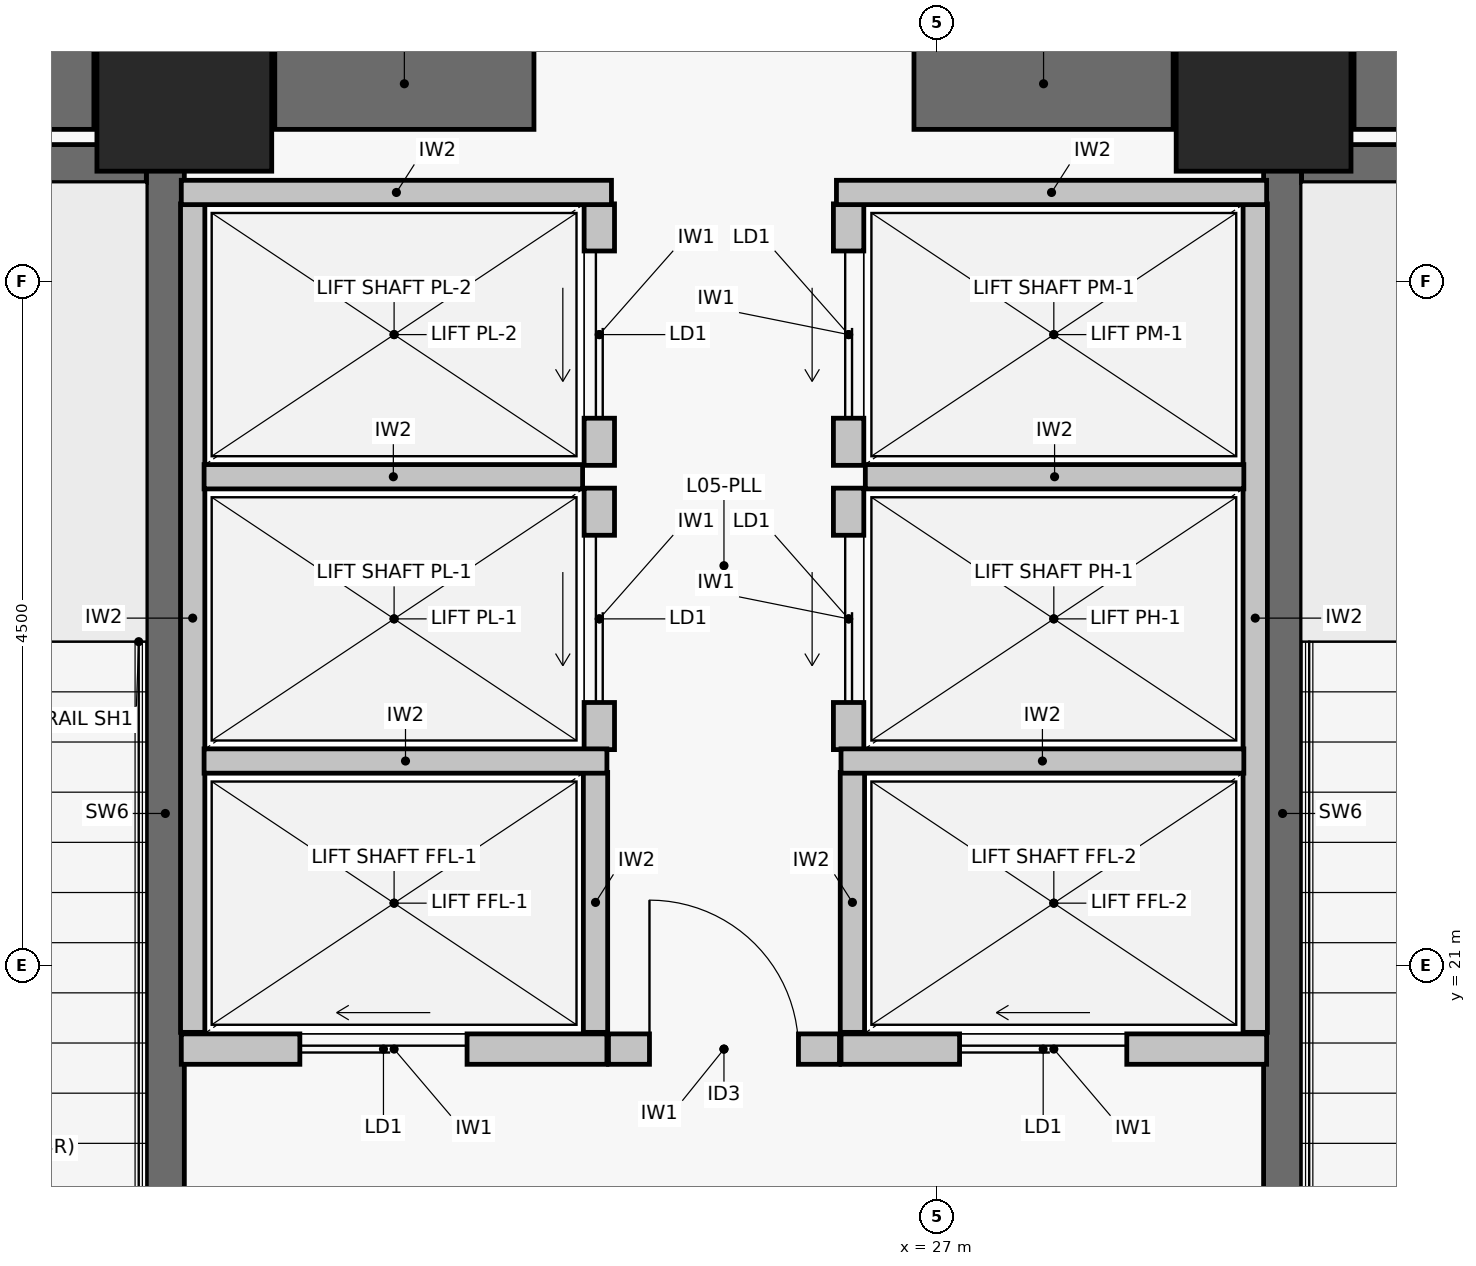
"""IFC4 building model, lengths in metres.
Left out: names, types, materials, properties, quantities, classifications, styles, units other than length and angle.
Written with IfcOpenShell. Run it as: python <this file> out.ifc"""

import sys

from ifc_helpers import new_model, si_unit, direction, frame, frame_2d, origin, origin_2d, place, context, subcontext, project, spatial, rectangle, extrude, element, fill, save


model = new_model("IFC4")
c1 = context("Model", 3, precision=1e-05, world=origin(), true_north=direction((0.0, 1.0)))
c2 = subcontext(c1, "Body", "Model", "MODEL_VIEW")
j1 = project(units=[si_unit("LENGTHUNIT", "METRE"), si_unit("PLANEANGLEUNIT", "RADIAN")], contexts=[c1])
p1 = place(None, origin())
s1 = spatial("IfcSite", under=j1, at=p1, CompositionType="ELEMENT")
p2 = place(p1, origin())
s2 = spatial("IfcBuilding", under=s1, at=p2, CompositionType="ELEMENT")
p3 = place(p2, frame((0.0, 0.0, 27.6)))
s3 = spatial("IfcBuildingStorey", under=s2, at=p3, CompositionType="ELEMENT", Elevation=27.6)
for number, where, z_axis, x_axis in (
    (1, (22.05, 26.8, 0.0), (0.0, 0.0, 1.0), (1.0, 0.0, 0.0)),
    (2, (29.15, 26.8, 0.0), (0.0, 0.0, 1.0), (1.0, 0.0, 0.0)),
):
    element("IfcColumn", number, at=place(p3, frame(where, z_axis=z_axis, x_axis=x_axis)), inside=s3, PredefinedType="COLUMN", context=c2, shape_type="SweptSolid", body=[
        extrude(rectangle(XDim=1.15, YDim=1.15, at=origin_2d()), origin(), (0.0, 0.0, 1.0), 3.72),
    ])
p4 = place(p3, frame((18.395, 26.8, 0.0), z_axis=(0.0, 0.0, 1.0), x_axis=(1.0, 0.0, 0.0)))
e3 = element("IfcWall", 3, at=p4, inside=s3, PredefinedType="SHEAR", context=c2, shape_type="SweptSolid", body=[
    extrude(rectangle(XDim=3.06, YDim=0.6, at=frame_2d((1.53, 0.0))), origin(), (0.0, 0.0, 1.0), 3.47),
])
p5 = place(p3, frame((22.645, 26.8, 0.0), z_axis=(0.0, 0.0, 1.0), x_axis=(1.0, 0.0, 0.0)))
e4 = element("IfcWall", 4, at=p5, inside=s3, PredefinedType="SHEAR", context=c2, shape_type="SweptSolid", body=[
    extrude(rectangle(XDim=1.705, YDim=0.6, at=frame_2d((0.853, 0.0))), origin(), (0.0, 0.0, 1.0), 3.47),
])
p6 = place(p3, frame((26.85, 26.8, 0.0), z_axis=(0.0, 0.0, 1.0), x_axis=(1.0, 0.0, 0.0)))
e5 = element("IfcWall", 5, at=p6, inside=s3, PredefinedType="SHEAR", context=c2, shape_type="SweptSolid", body=[
    extrude(rectangle(XDim=1.705, YDim=0.6, at=frame_2d((0.853, 0.0))), origin(), (0.0, 0.0, 1.0), 3.47),
])
p7 = place(p3, frame((29.745, 26.8, 0.0), z_axis=(0.0, 0.0, 1.0), x_axis=(1.0, 0.0, 0.0)))
e6 = element("IfcWall", 6, at=p7, inside=s3, PredefinedType="SHEAR", context=c2, shape_type="SweptSolid", body=[
    extrude(rectangle(XDim=3.06, YDim=0.6, at=frame_2d((1.53, 0.0))), origin(), (0.0, 0.0, 1.0), 3.47),
])
p8 = place(p3, frame((21.925, 17.6, 0.0), z_axis=(0.0, 0.0, 1.0), x_axis=(0.0, 1.0, 0.0)))
e7 = element("IfcWall", 7, at=p8, inside=s3, PredefinedType="SHEAR", context=c2, shape_type="SweptSolid", body=[
    extrude(rectangle(XDim=8.8, YDim=0.25, at=frame_2d((4.4, 0.0))), origin(), (0.0, 0.0, 1.0), 3.47),
])
p9 = place(p8, frame((0.35, 0.0, 0.0)))
e8 = element("IfcOpeningElement", 8, at=p9, cuts=e7, PredefinedType="OPENING", context=c2, shape_type="SweptSolid", body=[
    extrude(rectangle(XDim=1.05, YDim=2.08, at=frame_2d((0.525, 1.04))), frame((0.0, 0.135, 0.0), z_axis=(0.0, -1.0, 0.0), x_axis=(1.0, 0.0, 0.0)), (0.0, 0.0, 1.0), 0.27),
])
p10 = place(p3, frame((18.354, 26.275, 0.0), z_axis=(0.0, 0.0, 1.0), x_axis=(1.0, 0.0, 0.0)))
e9 = element("IfcWall", 9, at=p10, inside=s3, PredefinedType="SHEAR", context=c2, shape_type="SweptSolid", body=[
    extrude(rectangle(XDim=3.446, YDim=0.25, at=frame_2d((1.723, 0.0))), origin(), (0.0, 0.0, 1.0), 3.47),
])
p11 = place(p3, frame((29.275, 17.6, 0.0), z_axis=(0.0, 0.0, 1.0), x_axis=(0.0, 1.0, 0.0)))
e10 = element("IfcWall", 10, at=p11, inside=s3, PredefinedType="SHEAR", context=c2, shape_type="SweptSolid", body=[
    extrude(rectangle(XDim=8.8, YDim=0.25, at=frame_2d((4.4, 0.0))), origin(), (0.0, 0.0, 1.0), 3.47),
])
p12 = place(p11, frame((0.35, 0.0, 0.0)))
e11 = element("IfcOpeningElement", 11, at=p12, cuts=e10, PredefinedType="OPENING", context=c2, shape_type="SweptSolid", body=[
    extrude(rectangle(XDim=1.05, YDim=2.08, at=frame_2d((0.525, 1.04))), frame((0.0, 0.135, 0.0), z_axis=(0.0, -1.0, 0.0), x_axis=(1.0, 0.0, 0.0)), (0.0, 0.0, 1.0), 0.27),
])
p13 = place(p3, frame((29.4, 26.275, 0.0), z_axis=(0.0, 0.0, 1.0), x_axis=(1.0, 0.0, 0.0)))
e12 = element("IfcWall", 12, at=p13, inside=s3, PredefinedType="SHEAR", context=c2, shape_type="SweptSolid", body=[
    extrude(rectangle(XDim=3.446, YDim=0.25, at=frame_2d((1.723, 0.0))), origin(), (0.0, 0.0, 1.0), 3.47),
])
p14 = place(p3, frame((24.84, 20.45, 0.0), z_axis=(0.0, 0.0, 1.0), x_axis=(1.0, 0.0, 0.0)))
e13 = element("IfcWall", 13, at=p14, inside=s3, PredefinedType="PARTITIONING", context=c2, shape_type="SweptSolid", body=[
    extrude(rectangle(XDim=1.52, YDim=0.2, at=frame_2d((0.76, 0.0))), origin(), (0.0, 0.0, 1.0), 3.47),
])
p15 = place(p14, frame((0.27, 0.0, 0.0)))
e14 = element("IfcOpeningElement", 14, at=p15, cuts=e13, PredefinedType="OPENING", context=c2, shape_type="SweptSolid", body=[
    extrude(rectangle(XDim=0.98, YDim=2.06, at=frame_2d((0.49, 1.03))), frame((0.0, 0.11, 0.0), z_axis=(0.0, -1.0, 0.0), x_axis=(1.0, 0.0, 0.0)), (0.0, 0.0, 1.0), 0.22),
])
p16 = place(p3, frame((22.03, 20.45, 0.0), z_axis=(0.0, 0.0, 1.0), x_axis=(1.0, 0.0, 0.0)))
e15 = element("IfcWall", 15, at=p16, inside=s3, PredefinedType="PARTITIONING", context=c2, shape_type="SweptSolid", body=[
    extrude(rectangle(XDim=2.8, YDim=0.2, at=frame_2d((1.4, 0.0))), origin(), (0.0, 0.0, 1.0), 3.47),
])
p17 = place(p16, frame((0.78, 0.0, 0.0)))
e16 = element("IfcOpeningElement", 16, at=p17, cuts=e15, PredefinedType="OPENING", context=c2, shape_type="SweptSolid", body=[
    extrude(rectangle(XDim=1.1, YDim=2.08, at=frame_2d((0.55, 1.04))), frame((0.0, 0.11, 0.0), z_axis=(0.0, -1.0, 0.0), x_axis=(1.0, 0.0, 0.0)), (0.0, 0.0, 1.0), 0.22),
])
p18 = place(p3, frame((26.37, 20.45, 0.0), z_axis=(0.0, 0.0, 1.0), x_axis=(1.0, 0.0, 0.0)))
e17 = element("IfcWall", 17, at=p18, inside=s3, PredefinedType="PARTITIONING", context=c2, shape_type="SweptSolid", body=[
    extrude(rectangle(XDim=2.8, YDim=0.2, at=frame_2d((1.4, 0.0))), origin(), (0.0, 0.0, 1.0), 3.47),
])
p19 = place(p18, frame((0.78, 0.0, 0.0)))
e18 = element("IfcOpeningElement", 18, at=p19, cuts=e17, PredefinedType="OPENING", context=c2, shape_type="SweptSolid", body=[
    extrude(rectangle(XDim=1.1, YDim=2.08, at=frame_2d((0.55, 1.04))), frame((0.0, 0.11, 0.0), z_axis=(0.0, -1.0, 0.0), x_axis=(1.0, 0.0, 0.0)), (0.0, 0.0, 1.0), 0.22),
])
p20 = place(p3, frame((24.78, 22.42, 0.0), z_axis=(0.0, 0.0, 1.0), x_axis=(0.0, 1.0, 0.0)))
e19 = element("IfcWall", 19, at=p20, inside=s3, PredefinedType="PARTITIONING", context=c2, shape_type="SweptSolid", body=[
    extrude(rectangle(XDim=1.72, YDim=0.2, at=frame_2d((0.86, 0.0))), origin(), (0.0, 0.0, 1.0), 3.47),
])
p21 = place(p20, frame((0.31, 0.0, 0.0)))
e20 = element("IfcOpeningElement", 20, at=p21, cuts=e19, PredefinedType="OPENING", context=c2, shape_type="SweptSolid", body=[
    extrude(rectangle(XDim=1.1, YDim=2.08, at=frame_2d((0.55, 1.04))), frame((0.0, 0.11, 0.0), z_axis=(0.0, -1.0, 0.0), x_axis=(1.0, 0.0, 0.0)), (0.0, 0.0, 1.0), 0.22),
])
p22 = place(p3, frame((24.78, 24.29, 0.0), z_axis=(0.0, 0.0, 1.0), x_axis=(0.0, 1.0, 0.0)))
e21 = element("IfcWall", 21, at=p22, inside=s3, PredefinedType="PARTITIONING", context=c2, shape_type="SweptSolid", body=[
    extrude(rectangle(XDim=1.72, YDim=0.2, at=frame_2d((0.86, 0.0))), origin(), (0.0, 0.0, 1.0), 3.47),
])
p23 = place(p22, frame((0.31, 0.0, 0.0)))
e22 = element("IfcOpeningElement", 22, at=p23, cuts=e21, PredefinedType="OPENING", context=c2, shape_type="SweptSolid", body=[
    extrude(rectangle(XDim=1.1, YDim=2.08, at=frame_2d((0.55, 1.04))), frame((0.0, 0.11, 0.0), z_axis=(0.0, -1.0, 0.0), x_axis=(1.0, 0.0, 0.0)), (0.0, 0.0, 1.0), 0.22),
])
p24 = place(p3, frame((26.42, 22.42, 0.0), z_axis=(0.0, 0.0, 1.0), x_axis=(0.0, 1.0, 0.0)))
e23 = element("IfcWall", 23, at=p24, inside=s3, PredefinedType="PARTITIONING", context=c2, shape_type="SweptSolid", body=[
    extrude(rectangle(XDim=1.72, YDim=0.2, at=frame_2d((0.86, 0.0))), origin(), (0.0, 0.0, 1.0), 3.47),
])
p25 = place(p24, frame((0.31, 0.0, 0.0)))
e24 = element("IfcOpeningElement", 24, at=p25, cuts=e23, PredefinedType="OPENING", context=c2, shape_type="SweptSolid", body=[
    extrude(rectangle(XDim=1.1, YDim=2.08, at=frame_2d((0.55, 1.04))), frame((0.0, 0.11, 0.0), z_axis=(0.0, -1.0, 0.0), x_axis=(1.0, 0.0, 0.0)), (0.0, 0.0, 1.0), 0.22),
])
p26 = place(p3, frame((26.42, 24.29, 0.0), z_axis=(0.0, 0.0, 1.0), x_axis=(0.0, 1.0, 0.0)))
e25 = element("IfcWall", 25, at=p26, inside=s3, PredefinedType="PARTITIONING", context=c2, shape_type="SweptSolid", body=[
    extrude(rectangle(XDim=1.72, YDim=0.2, at=frame_2d((0.86, 0.0))), origin(), (0.0, 0.0, 1.0), 3.47),
])
p27 = place(p26, frame((0.31, 0.0, 0.0)))
e26 = element("IfcOpeningElement", 26, at=p27, cuts=e25, PredefinedType="OPENING", context=c2, shape_type="SweptSolid", body=[
    extrude(rectangle(XDim=1.1, YDim=2.08, at=frame_2d((0.55, 1.04))), frame((0.0, 0.11, 0.0), z_axis=(0.0, -1.0, 0.0), x_axis=(1.0, 0.0, 0.0)), (0.0, 0.0, 1.0), 0.22),
])
p28 = place(p3, frame((22.105, 20.56, 0.0), z_axis=(0.0, 0.0, 1.0), x_axis=(0.0, 1.0, 0.0)))
e27 = element("IfcWall", 27, at=p28, inside=s3, PredefinedType="PARTITIONING", context=c2, shape_type="SweptSolid", body=[
    extrude(rectangle(XDim=5.45, YDim=0.16, at=frame_2d((2.725, 0.0))), origin(), (0.0, 0.0, 1.0), 3.47),
])
p29 = place(p3, frame((24.755, 20.56, 0.0), z_axis=(0.0, 0.0, 1.0), x_axis=(0.0, 1.0, 0.0)))
e28 = element("IfcWall", 28, at=p29, inside=s3, PredefinedType="PARTITIONING", context=c2, shape_type="SweptSolid", body=[
    extrude(rectangle(XDim=1.71, YDim=0.16, at=frame_2d((0.855, 0.0))), origin(), (0.0, 0.0, 1.0), 3.47),
])
p30 = place(p3, frame((22.18, 22.345, 0.0), z_axis=(0.0, 0.0, 1.0), x_axis=(1.0, 0.0, 0.0)))
e29 = element("IfcWall", 29, at=p30, inside=s3, PredefinedType="PARTITIONING", context=c2, shape_type="SweptSolid", body=[
    extrude(rectangle(XDim=2.65, YDim=0.16, at=frame_2d((1.325, 0.0))), origin(), (0.0, 0.0, 1.0), 3.47),
])
p31 = place(p3, frame((22.18, 24.215, 0.0), z_axis=(0.0, 0.0, 1.0), x_axis=(1.0, 0.0, 0.0)))
e30 = element("IfcWall", 30, at=p31, inside=s3, PredefinedType="PARTITIONING", context=c2, shape_type="SweptSolid", body=[
    extrude(rectangle(XDim=2.49, YDim=0.16, at=frame_2d((1.245, 0.0))), origin(), (0.0, 0.0, 1.0), 3.47),
])
p32 = place(p3, frame((22.03, 26.085, 0.0), z_axis=(0.0, 0.0, 1.0), x_axis=(1.0, 0.0, 0.0)))
e31 = element("IfcWall", 31, at=p32, inside=s3, PredefinedType="PARTITIONING", context=c2, shape_type="SweptSolid", body=[
    extrude(rectangle(XDim=2.83, YDim=0.16, at=frame_2d((1.415, 0.0))), origin(), (0.0, 0.0, 1.0), 3.47),
])
p33 = place(p3, frame((29.095, 20.56, 0.0), z_axis=(0.0, 0.0, 1.0), x_axis=(0.0, 1.0, 0.0)))
e32 = element("IfcWall", 32, at=p33, inside=s3, PredefinedType="PARTITIONING", context=c2, shape_type="SweptSolid", body=[
    extrude(rectangle(XDim=5.45, YDim=0.16, at=frame_2d((2.725, 0.0))), origin(), (0.0, 0.0, 1.0), 3.47),
])
p34 = place(p3, frame((26.445, 20.56, 0.0), z_axis=(0.0, 0.0, 1.0), x_axis=(0.0, 1.0, 0.0)))
e33 = element("IfcWall", 33, at=p34, inside=s3, PredefinedType="PARTITIONING", context=c2, shape_type="SweptSolid", body=[
    extrude(rectangle(XDim=1.71, YDim=0.16, at=frame_2d((0.855, 0.0))), origin(), (0.0, 0.0, 1.0), 3.47),
])
p35 = place(p3, frame((26.37, 22.345, 0.0), z_axis=(0.0, 0.0, 1.0), x_axis=(1.0, 0.0, 0.0)))
e34 = element("IfcWall", 34, at=p35, inside=s3, PredefinedType="PARTITIONING", context=c2, shape_type="SweptSolid", body=[
    extrude(rectangle(XDim=2.65, YDim=0.16, at=frame_2d((1.325, 0.0))), origin(), (0.0, 0.0, 1.0), 3.47),
])
p36 = place(p3, frame((26.53, 24.215, 0.0), z_axis=(0.0, 0.0, 1.0), x_axis=(1.0, 0.0, 0.0)))
e35 = element("IfcWall", 35, at=p36, inside=s3, PredefinedType="PARTITIONING", context=c2, shape_type="SweptSolid", body=[
    extrude(rectangle(XDim=2.49, YDim=0.16, at=frame_2d((1.245, 0.0))), origin(), (0.0, 0.0, 1.0), 3.47),
])
p37 = place(p3, frame((26.34, 26.085, 0.0), z_axis=(0.0, 0.0, 1.0), x_axis=(1.0, 0.0, 0.0)))
e36 = element("IfcWall", 36, at=p37, inside=s3, PredefinedType="PARTITIONING", context=c2, shape_type="SweptSolid", body=[
    extrude(rectangle(XDim=2.83, YDim=0.16, at=frame_2d((1.415, 0.0))), origin(), (0.0, 0.0, 1.0), 3.47),
])
p38 = place(p15, origin())
e37 = element("IfcDoor", 37, at=p38, inside=s3, OperationType="SINGLE_SWING_LEFT", PredefinedType="DOOR", context=c2, shape_type="SweptSolid", body=[
    extrude(rectangle(XDim=0.98, YDim=2.06, at=frame_2d((0.49, 1.03))), frame((0.0, 0.025, 0.0), z_axis=(0.0, -1.0, 0.0), x_axis=(1.0, 0.0, 0.0)), (0.0, 0.0, 1.0), 0.05),
])
fill(e14, e37)
p39 = place(p17, origin())
e38 = element("IfcDoor", 38, at=p39, inside=s3, OperationType="DOUBLE_DOOR_SLIDING", PredefinedType="DOOR", context=c2, shape_type="SweptSolid", body=[
    extrude(rectangle(XDim=1.1, YDim=2.08, at=frame_2d((0.55, 1.04))), frame((0.0, 0.025, 0.0), z_axis=(0.0, -1.0, 0.0), x_axis=(1.0, 0.0, 0.0)), (0.0, 0.0, 1.0), 0.05),
])
fill(e16, e38)
p40 = place(p19, origin())
e39 = element("IfcDoor", 39, at=p40, inside=s3, OperationType="DOUBLE_DOOR_SLIDING", PredefinedType="DOOR", context=c2, shape_type="SweptSolid", body=[
    extrude(rectangle(XDim=1.1, YDim=2.08, at=frame_2d((0.55, 1.04))), frame((0.0, 0.025, 0.0), z_axis=(0.0, -1.0, 0.0), x_axis=(1.0, 0.0, 0.0)), (0.0, 0.0, 1.0), 0.05),
])
fill(e18, e39)
p41 = place(p21, origin())
e40 = element("IfcDoor", 40, at=p41, inside=s3, OperationType="DOUBLE_DOOR_SLIDING", PredefinedType="DOOR", context=c2, shape_type="SweptSolid", body=[
    extrude(rectangle(XDim=1.1, YDim=2.08, at=frame_2d((0.55, 1.04))), frame((0.0, 0.025, 0.0), z_axis=(0.0, -1.0, 0.0), x_axis=(1.0, 0.0, 0.0)), (0.0, 0.0, 1.0), 0.05),
])
fill(e20, e40)
p42 = place(p23, origin())
e41 = element("IfcDoor", 41, at=p42, inside=s3, OperationType="DOUBLE_DOOR_SLIDING", PredefinedType="DOOR", context=c2, shape_type="SweptSolid", body=[
    extrude(rectangle(XDim=1.1, YDim=2.08, at=frame_2d((0.55, 1.04))), frame((0.0, 0.025, 0.0), z_axis=(0.0, -1.0, 0.0), x_axis=(1.0, 0.0, 0.0)), (0.0, 0.0, 1.0), 0.05),
])
fill(e22, e41)
p43 = place(p25, origin())
e42 = element("IfcDoor", 42, at=p43, inside=s3, OperationType="DOUBLE_DOOR_SLIDING", PredefinedType="DOOR", context=c2, shape_type="SweptSolid", body=[
    extrude(rectangle(XDim=1.1, YDim=2.08, at=frame_2d((0.55, 1.04))), frame((0.0, 0.025, 0.0), z_axis=(0.0, -1.0, 0.0), x_axis=(1.0, 0.0, 0.0)), (0.0, 0.0, 1.0), 0.05),
])
fill(e24, e42)
p44 = place(p27, origin())
e43 = element("IfcDoor", 43, at=p44, inside=s3, OperationType="DOUBLE_DOOR_SLIDING", PredefinedType="DOOR", context=c2, shape_type="SweptSolid", body=[
    extrude(rectangle(XDim=1.1, YDim=2.08, at=frame_2d((0.55, 1.04))), frame((0.0, 0.025, 0.0), z_axis=(0.0, -1.0, 0.0), x_axis=(1.0, 0.0, 0.0)), (0.0, 0.0, 1.0), 0.05),
])
fill(e26, e43)
save(model, sys.argv[1])
